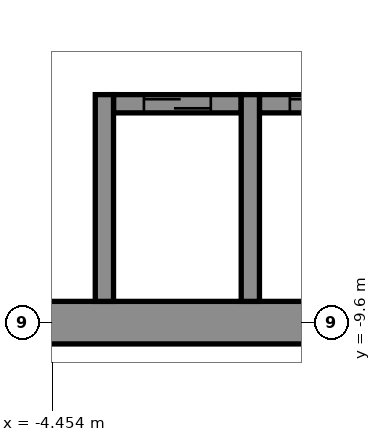
"""IFC4 building model, lengths in metres.
Left out: names, types, materials, properties, quantities, classifications, styles, units other than length and angle.
Written with IfcOpenShell. Run it as: python <this file> out.ifc"""

import sys

from ifc_helpers import new_model, si_unit, direction, frame, frame_2d, origin, place, context, subcontext, project, spatial, rectangle, extrude, element, fill, save


model = new_model("IFC4")
c1 = context("Model", 3, precision=1e-05, world=origin(), true_north=direction((0.0, 1.0)))
c2 = subcontext(c1, "Body", "Model", "MODEL_VIEW")
j1 = project(units=[si_unit("LENGTHUNIT", "METRE"), si_unit("PLANEANGLEUNIT", "RADIAN")], contexts=[c1])
p1 = place(None, origin())
s1 = spatial("IfcSite", under=j1, at=p1, CompositionType="ELEMENT")
p2 = place(p1, origin())
s2 = spatial("IfcBuilding", under=s1, at=p2, CompositionType="ELEMENT")
p3 = place(p2, frame((0.0, 0.0, 166.1)))
s3 = spatial("IfcBuildingStorey", under=s2, at=p3, CompositionType="ELEMENT", Elevation=166.1)
p4 = place(p3, frame((-5.25, -9.6, -0.15), z_axis=(0.0, 0.0, 1.0), x_axis=(1.0, 0.0, 0.0)))
e1 = element("IfcWall", 1, at=p4, inside=s3, PredefinedType="SHEAR", context=c2, shape_type="SweptSolid", body=[
    extrude(rectangle(XDim=10.2, YDim=0.7, at=frame_2d((5.1, 0.0))), origin(), (0.0, 0.0, 1.0), 3.9),
])
p5 = place(p4, frame((9.0, 0.0, 0.15)))
e2 = element("IfcOpeningElement", 2, at=p5, cuts=e1, PredefinedType="OPENING", context=c2, shape_type="SweptSolid", body=[
    extrude(rectangle(XDim=0.9, YDim=2.1, at=frame_2d((0.45, 1.05))), frame((0.0, 0.36, 0.0), z_axis=(0.0, -1.0, 0.0), x_axis=(1.0, 0.0, 0.0)), (0.0, 0.0, 1.0), 0.72),
])
p6 = place(p3, frame((-3.45, -6.0, -0.15), z_axis=(0.0, 0.0, 1.0), x_axis=(1.0, 0.0, 0.0)))
e3 = element("IfcWall", 3, at=p6, inside=s3, PredefinedType="STANDARD", context=c2, shape_type="SweptSolid", body=[
    extrude(rectangle(XDim=2.1, YDim=0.3, at=frame_2d((1.05, 0.0))), origin(), (0.0, 0.0, 1.0), 3.9),
])
p7 = place(p6, frame((0.5, 0.0, 0.15)))
e4 = element("IfcOpeningElement", 4, at=p7, cuts=e3, PredefinedType="OPENING", context=c2, shape_type="SweptSolid", body=[
    extrude(rectangle(XDim=1.1, YDim=2.1, at=frame_2d((0.55, 1.05))), frame((0.0, 0.16, 0.0), z_axis=(0.0, -1.0, 0.0), x_axis=(1.0, 0.0, 0.0)), (0.0, 0.0, 1.0), 0.32),
])
p8 = place(p3, frame((-1.05, -6.0, -0.15), z_axis=(0.0, 0.0, 1.0), x_axis=(1.0, 0.0, 0.0)))
e5 = element("IfcWall", 5, at=p8, inside=s3, PredefinedType="STANDARD", context=c2, shape_type="SweptSolid", body=[
    extrude(rectangle(XDim=2.1, YDim=0.3, at=frame_2d((1.05, 0.0))), origin(), (0.0, 0.0, 1.0), 3.9),
])
p9 = place(p8, frame((0.5, 0.0, 0.15)))
e6 = element("IfcOpeningElement", 6, at=p9, cuts=e5, PredefinedType="OPENING", context=c2, shape_type="SweptSolid", body=[
    extrude(rectangle(XDim=1.1, YDim=2.1, at=frame_2d((0.55, 1.05))), frame((0.0, 0.16, 0.0), z_axis=(0.0, -1.0, 0.0), x_axis=(1.0, 0.0, 0.0)), (0.0, 0.0, 1.0), 0.32),
])
for number, where, z_axis, x_axis in (
    (7, (-3.6, -9.25, -0.15), (0.0, 0.0, 1.0), (0.0, 1.0, 0.0)),
    (8, (-1.2, -9.25, -0.15), (0.0, 0.0, 1.0), (0.0, 1.0, 0.0)),
):
    element("IfcWall", number, at=place(p3, frame(where, z_axis=z_axis, x_axis=x_axis)), inside=s3, PredefinedType="STANDARD", context=c2, shape_type="SweptSolid", body=[
        extrude(rectangle(XDim=3.4, YDim=0.3, at=frame_2d((1.7, 0.0))), origin(), (0.0, 0.0, 1.0), 3.9),
    ])
p10 = place(p7, origin())
e9 = element("IfcDoor", 9, at=p10, inside=s3, OperationType="DOUBLE_DOOR_SLIDING", PredefinedType="DOOR", context=c2, shape_type="SweptSolid", body=[
    extrude(rectangle(XDim=1.1, YDim=2.1, at=frame_2d((0.55, 1.05))), frame((0.0, 0.025, 0.0), z_axis=(0.0, -1.0, 0.0), x_axis=(1.0, 0.0, 0.0)), (0.0, 0.0, 1.0), 0.05),
])
fill(e4, e9)
p11 = place(p9, origin())
e10 = element("IfcDoor", 10, at=p11, inside=s3, OperationType="DOUBLE_DOOR_SLIDING", PredefinedType="DOOR", context=c2, shape_type="SweptSolid", body=[
    extrude(rectangle(XDim=1.1, YDim=2.1, at=frame_2d((0.55, 1.05))), frame((0.0, 0.025, 0.0), z_axis=(0.0, -1.0, 0.0), x_axis=(1.0, 0.0, 0.0)), (0.0, 0.0, 1.0), 0.05),
])
fill(e6, e10)
save(model, sys.argv[1])
